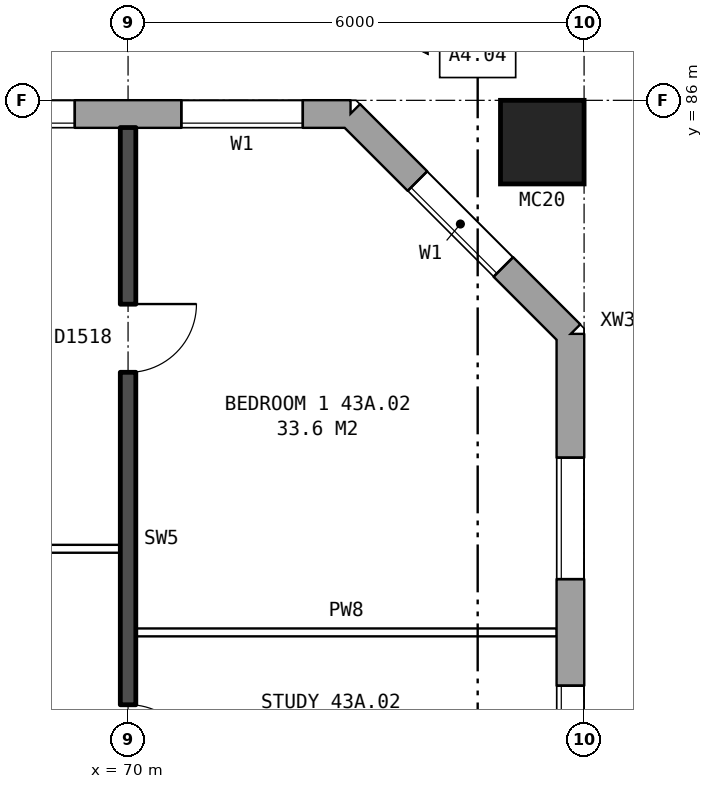
"""IFC4 building model, lengths in metres.
Left out: names, types, materials, properties, quantities, classifications, styles, units other than length and angle.
Written with IfcOpenShell. Run it as: python <this file> out.ifc"""

import sys

from ifc_helpers import new_model, si_unit, direction, frame, frame_2d, origin, origin_2d, place, context, subcontext, project, spatial, rectangle, hollow_rectangle, extrude, element, fill, save


model = new_model("IFC4")
c1 = context("Model", 3, precision=1e-05, world=origin(), true_north=direction((0.0, 1.0)))
c2 = subcontext(c1, "Body", "Model", "MODEL_VIEW")
j1 = project(units=[si_unit("LENGTHUNIT", "METRE"), si_unit("PLANEANGLEUNIT", "RADIAN")], contexts=[c1])
p1 = place(None, origin())
s1 = spatial("IfcSite", under=j1, at=p1, CompositionType="ELEMENT")
p2 = place(p1, origin())
s2 = spatial("IfcBuilding", under=s1, at=p2, CompositionType="ELEMENT")
p3 = place(p2, frame((0.0, 0.0, 154.7)))
s3 = spatial("IfcBuildingStorey", under=s2, at=p3, CompositionType="ELEMENT", Elevation=154.7)
p4 = place(p3, frame((75.45, 85.45, 0.0), z_axis=(0.0, 0.0, 1.0), x_axis=(1.0, 0.0, 0.0)))
e1 = element("IfcColumn", 1, at=p4, inside=s3, PredefinedType="COLUMN", context=c2, shape_type="SweptSolid", body=[
    extrude(hollow_rectangle(XDim=1.1, YDim=1.1, WallThickness=0.06, at=origin_2d()), origin(), (0.0, 0.0, 1.0), 3.1),
])
p5 = place(p3, frame((75.82, 57.075, 0.0), z_axis=(0.0, 0.0, 1.0), x_axis=(0.0, 1.0, 0.0)))
e2 = element("IfcWall", 2, at=p5, inside=s3, PredefinedType="STANDARD", context=c2, shape_type="SweptSolid", body=[
    extrude(rectangle(XDim=25.851, YDim=0.36, at=frame_2d((12.925, 0.0))), origin(), (0.0, 0.0, 1.0), 2.85),
])
p6 = place(p5, frame((1.625, 0.0, 0.8)))
e3 = element("IfcOpeningElement", 3, at=p6, cuts=e2, PredefinedType="OPENING", context=c2, shape_type="SweptSolid", body=[
    extrude(rectangle(XDim=1.6, YDim=1.8, at=frame_2d((0.8, 0.9))), frame((0.0, 0.19, 0.0), z_axis=(0.0, -1.0, 0.0), x_axis=(1.0, 0.0, 0.0)), (0.0, 0.0, 1.0), 0.38),
])
p7 = place(p5, frame((4.625, 0.0, 0.8)))
e4 = element("IfcOpeningElement", 4, at=p7, cuts=e2, PredefinedType="OPENING", context=c2, shape_type="SweptSolid", body=[
    extrude(rectangle(XDim=1.6, YDim=1.8, at=frame_2d((0.8, 0.9))), frame((0.0, 0.19, 0.0), z_axis=(0.0, -1.0, 0.0), x_axis=(1.0, 0.0, 0.0)), (0.0, 0.0, 1.0), 0.38),
])
p8 = place(p5, frame((19.625, 0.0, 0.8)))
e5 = element("IfcOpeningElement", 5, at=p8, cuts=e2, PredefinedType="OPENING", context=c2, shape_type="SweptSolid", body=[
    extrude(rectangle(XDim=1.6, YDim=1.8, at=frame_2d((0.8, 0.9))), frame((0.0, 0.19, 0.0), z_axis=(0.0, -1.0, 0.0), x_axis=(1.0, 0.0, 0.0)), (0.0, 0.0, 1.0), 0.38),
])
p9 = place(p5, frame((22.625, 0.0, 0.8)))
e6 = element("IfcOpeningElement", 6, at=p9, cuts=e2, PredefinedType="OPENING", context=c2, shape_type="SweptSolid", body=[
    extrude(rectangle(XDim=1.6, YDim=1.8, at=frame_2d((0.8, 0.9))), frame((0.0, 0.19, 0.0), z_axis=(0.0, -1.0, 0.0), x_axis=(1.0, 0.0, 0.0)), (0.0, 0.0, 1.0), 0.38),
])
p10 = place(p3, frame((75.82, 82.925, 0.0), z_axis=(0.0, 0.0, 1.0), x_axis=(-0.707106781187, 0.707106781187, 0.0)))
e7 = element("IfcWall", 7, at=p10, inside=s3, PredefinedType="STANDARD", context=c2, shape_type="SweptSolid", body=[
    extrude(rectangle(XDim=4.094, YDim=0.36, at=frame_2d((2.047, 0.0))), origin(), (0.0, 0.0, 1.0), 2.85),
])
p11 = place(p10, frame((1.247, 0.0, 0.8)))
e8 = element("IfcOpeningElement", 8, at=p11, cuts=e7, PredefinedType="OPENING", context=c2, shape_type="SweptSolid", body=[
    extrude(rectangle(XDim=1.6, YDim=1.8, at=frame_2d((0.8, 0.9))), frame((0.0, 0.19, 0.0), z_axis=(0.0, -1.0, 0.0), x_axis=(1.0, 0.0, 0.0)), (0.0, 0.0, 1.0), 0.38),
])
p12 = place(p3, frame((72.925, 85.82, 0.0), z_axis=(0.0, 0.0, 1.0), x_axis=(-1.0, 0.0, 0.0)))
e9 = element("IfcWall", 9, at=p12, inside=s3, PredefinedType="STANDARD", context=c2, shape_type="SweptSolid", body=[
    extrude(rectangle(XDim=41.351, YDim=0.36, at=frame_2d((20.675, 0.0))), origin(), (0.0, 0.0, 1.0), 2.85),
])
p13 = place(p12, frame((0.625, 0.0, 0.8)))
e10 = element("IfcOpeningElement", 10, at=p13, cuts=e9, PredefinedType="OPENING", context=c2, shape_type="SweptSolid", body=[
    extrude(rectangle(XDim=1.6, YDim=1.8, at=frame_2d((0.8, 0.9))), frame((0.0, 0.19, 0.0), z_axis=(0.0, -1.0, 0.0), x_axis=(1.0, 0.0, 0.0)), (0.0, 0.0, 1.0), 0.38),
])
p14 = place(p12, frame((3.625, 0.0, 0.8)))
e11 = element("IfcOpeningElement", 11, at=p14, cuts=e9, PredefinedType="OPENING", context=c2, shape_type="SweptSolid", body=[
    extrude(rectangle(XDim=1.6, YDim=1.8, at=frame_2d((0.8, 0.9))), frame((0.0, 0.19, 0.0), z_axis=(0.0, -1.0, 0.0), x_axis=(1.0, 0.0, 0.0)), (0.0, 0.0, 1.0), 0.38),
])
p15 = place(p12, frame((5.525, 0.0, 1.7)))
e12 = element("IfcOpeningElement", 12, at=p15, cuts=e9, PredefinedType="OPENING", context=c2, shape_type="SweptSolid", body=[
    extrude(rectangle(XDim=1.4, YDim=0.9, at=frame_2d((0.7, 0.45))), frame((0.0, 0.19, 0.0), z_axis=(0.0, -1.0, 0.0), x_axis=(1.0, 0.0, 0.0)), (0.0, 0.0, 1.0), 0.38),
])
p16 = place(p12, frame((9.625, 0.0, 0.8)))
e13 = element("IfcOpeningElement", 13, at=p16, cuts=e9, PredefinedType="OPENING", context=c2, shape_type="SweptSolid", body=[
    extrude(rectangle(XDim=1.6, YDim=1.8, at=frame_2d((0.8, 0.9))), frame((0.0, 0.19, 0.0), z_axis=(0.0, -1.0, 0.0), x_axis=(1.0, 0.0, 0.0)), (0.0, 0.0, 1.0), 0.38),
])
p17 = place(p12, frame((12.625, 0.0, 0.8)))
e14 = element("IfcOpeningElement", 14, at=p17, cuts=e9, PredefinedType="OPENING", context=c2, shape_type="SweptSolid", body=[
    extrude(rectangle(XDim=1.6, YDim=1.8, at=frame_2d((0.8, 0.9))), frame((0.0, 0.19, 0.0), z_axis=(0.0, -1.0, 0.0), x_axis=(1.0, 0.0, 0.0)), (0.0, 0.0, 1.0), 0.38),
])
p18 = place(p12, frame((15.625, 0.0, 0.8)))
e15 = element("IfcOpeningElement", 15, at=p18, cuts=e9, PredefinedType="OPENING", context=c2, shape_type="SweptSolid", body=[
    extrude(rectangle(XDim=1.6, YDim=1.8, at=frame_2d((0.8, 0.9))), frame((0.0, 0.19, 0.0), z_axis=(0.0, -1.0, 0.0), x_axis=(1.0, 0.0, 0.0)), (0.0, 0.0, 1.0), 0.38),
])
p19 = place(p12, frame((18.625, 0.0, 0.8)))
e16 = element("IfcOpeningElement", 16, at=p19, cuts=e9, PredefinedType="OPENING", context=c2, shape_type="SweptSolid", body=[
    extrude(rectangle(XDim=1.6, YDim=1.8, at=frame_2d((0.8, 0.9))), frame((0.0, 0.19, 0.0), z_axis=(0.0, -1.0, 0.0), x_axis=(1.0, 0.0, 0.0)), (0.0, 0.0, 1.0), 0.38),
])
p20 = place(p12, frame((21.625, 0.0, 0.8)))
e17 = element("IfcOpeningElement", 17, at=p20, cuts=e9, PredefinedType="OPENING", context=c2, shape_type="SweptSolid", body=[
    extrude(rectangle(XDim=1.6, YDim=1.8, at=frame_2d((0.8, 0.9))), frame((0.0, 0.19, 0.0), z_axis=(0.0, -1.0, 0.0), x_axis=(1.0, 0.0, 0.0)), (0.0, 0.0, 1.0), 0.38),
])
p21 = place(p12, frame((24.625, 0.0, 0.8)))
e18 = element("IfcOpeningElement", 18, at=p21, cuts=e9, PredefinedType="OPENING", context=c2, shape_type="SweptSolid", body=[
    extrude(rectangle(XDim=1.6, YDim=1.8, at=frame_2d((0.8, 0.9))), frame((0.0, 0.19, 0.0), z_axis=(0.0, -1.0, 0.0), x_axis=(1.0, 0.0, 0.0)), (0.0, 0.0, 1.0), 0.38),
])
p22 = place(p12, frame((27.625, 0.0, 0.8)))
e19 = element("IfcOpeningElement", 19, at=p22, cuts=e9, PredefinedType="OPENING", context=c2, shape_type="SweptSolid", body=[
    extrude(rectangle(XDim=1.6, YDim=1.8, at=frame_2d((0.8, 0.9))), frame((0.0, 0.19, 0.0), z_axis=(0.0, -1.0, 0.0), x_axis=(1.0, 0.0, 0.0)), (0.0, 0.0, 1.0), 0.38),
])
p23 = place(p12, frame((30.625, 0.0, 0.8)))
e20 = element("IfcOpeningElement", 20, at=p23, cuts=e9, PredefinedType="OPENING", context=c2, shape_type="SweptSolid", body=[
    extrude(rectangle(XDim=1.6, YDim=1.8, at=frame_2d((0.8, 0.9))), frame((0.0, 0.19, 0.0), z_axis=(0.0, -1.0, 0.0), x_axis=(1.0, 0.0, 0.0)), (0.0, 0.0, 1.0), 0.38),
])
p24 = place(p12, frame((34.425, 0.0, 1.7)))
e21 = element("IfcOpeningElement", 21, at=p24, cuts=e9, PredefinedType="OPENING", context=c2, shape_type="SweptSolid", body=[
    extrude(rectangle(XDim=0.6, YDim=0.9, at=frame_2d((0.3, 0.45))), frame((0.0, 0.19, 0.0), z_axis=(0.0, -1.0, 0.0), x_axis=(1.0, 0.0, 0.0)), (0.0, 0.0, 1.0), 0.38),
])
p25 = place(p12, frame((36.625, 0.0, 0.8)))
e22 = element("IfcOpeningElement", 22, at=p25, cuts=e9, PredefinedType="OPENING", context=c2, shape_type="SweptSolid", body=[
    extrude(rectangle(XDim=1.6, YDim=1.8, at=frame_2d((0.8, 0.9))), frame((0.0, 0.19, 0.0), z_axis=(0.0, -1.0, 0.0), x_axis=(1.0, 0.0, 0.0)), (0.0, 0.0, 1.0), 0.38),
])
p26 = place(p12, frame((35.325, 0.0, 1.0)))
e23 = element("IfcOpeningElement", 23, at=p26, cuts=e9, PredefinedType="OPENING", context=c2, shape_type="SweptSolid", body=[
    extrude(rectangle(XDim=1.0, YDim=1.5, at=frame_2d((0.5, 0.75))), frame((0.0, 0.19, 0.0), z_axis=(0.0, -1.0, 0.0), x_axis=(1.0, 0.0, 0.0)), (0.0, 0.0, 1.0), 0.38),
])
p27 = place(p3, frame((70.1, 79.0, 0.0), z_axis=(0.0, 0.0, 1.0), x_axis=(1.0, 0.0, 0.0)))
e24 = element("IfcWall", 24, at=p27, inside=s3, PredefinedType="PARTITIONING", context=c2, shape_type="SweptSolid", body=[
    extrude(rectangle(XDim=5.54, YDim=0.1, at=frame_2d((2.77, 0.0))), origin(), (0.0, 0.0, 1.0), 2.85),
])
p28 = place(p3, frame((64.1, 80.1, 0.0), z_axis=(0.0, 0.0, 1.0), x_axis=(1.0, 0.0, 0.0)))
e25 = element("IfcWall", 25, at=p28, inside=s3, PredefinedType="PARTITIONING", context=c2, shape_type="SweptSolid", body=[
    extrude(rectangle(XDim=5.8, YDim=0.1, at=frame_2d((2.9, 0.0))), origin(), (0.0, 0.0, 1.0), 2.85),
])
p29 = place(p28, frame((3.6, 0.0, 0.0)))
e26 = element("IfcOpeningElement", 26, at=p29, cuts=e25, PredefinedType="OPENING", context=c2, shape_type="SweptSolid", body=[
    extrude(rectangle(XDim=0.9, YDim=2.1, at=frame_2d((0.45, 1.05))), frame((0.0, 0.06, 0.0), z_axis=(0.0, -1.0, 0.0), x_axis=(1.0, 0.0, 0.0)), (0.0, 0.0, 1.0), 0.12),
])
p30 = place(p28, frame((0.7, 0.0, 0.0)))
e27 = element("IfcOpeningElement", 27, at=p30, cuts=e25, PredefinedType="OPENING", context=c2, shape_type="SweptSolid", body=[
    extrude(rectangle(XDim=0.9, YDim=2.1, at=frame_2d((0.45, 1.05))), frame((0.0, 0.06, 0.0), z_axis=(0.0, -1.0, 0.0), x_axis=(1.0, 0.0, 0.0)), (0.0, 0.0, 1.0), 0.12),
])
p31 = place(p3, frame((70.0, 76.2, 0.0), z_axis=(0.0, 0.0, 1.0), x_axis=(0.0, 1.0, 0.0)))
e28 = element("IfcWall", 28, at=p31, inside=s3, PredefinedType="SOLIDWALL", context=c2, shape_type="SweptSolid", body=[
    extrude(rectangle(XDim=9.44, YDim=0.2, at=frame_2d((4.72, 0.0))), origin(), (0.0, 0.0, 1.0), 2.85),
])
p32 = place(p31, frame((6.22, 0.0, 0.0)))
e29 = element("IfcOpeningElement", 29, at=p32, cuts=e28, PredefinedType="OPENING", context=c2, shape_type="SweptSolid", body=[
    extrude(rectangle(XDim=0.9, YDim=2.1, at=frame_2d((0.45, 1.05))), frame((0.0, 0.11, 0.0), z_axis=(0.0, -1.0, 0.0), x_axis=(1.0, 0.0, 0.0)), (0.0, 0.0, 1.0), 0.22),
])
p33 = place(p31, frame((0.95, 0.0, 0.0)))
e30 = element("IfcOpeningElement", 30, at=p33, cuts=e28, PredefinedType="OPENING", context=c2, shape_type="SweptSolid", body=[
    extrude(rectangle(XDim=0.9, YDim=2.1, at=frame_2d((0.45, 1.05))), frame((0.0, 0.11, 0.0), z_axis=(0.0, -1.0, 0.0), x_axis=(1.0, 0.0, 0.0)), (0.0, 0.0, 1.0), 0.22),
])
p34 = place(p8, origin())
e31 = element("IfcWindow", 31, at=p34, inside=s3, PartitioningType="SINGLE_PANEL", PredefinedType="WINDOW", context=c2, shape_type="SweptSolid", body=[
    extrude(rectangle(XDim=1.6, YDim=1.8, at=frame_2d((0.8, 0.9))), frame((0.0, 0.15, 0.0), z_axis=(0.0, -1.0, 0.0), x_axis=(1.0, 0.0, 0.0)), (0.0, 0.0, 1.0), 0.06),
])
fill(e5, e31)
p35 = place(p9, origin())
e32 = element("IfcWindow", 32, at=p35, inside=s3, PartitioningType="SINGLE_PANEL", PredefinedType="WINDOW", context=c2, shape_type="SweptSolid", body=[
    extrude(rectangle(XDim=1.6, YDim=1.8, at=frame_2d((0.8, 0.9))), frame((0.0, 0.15, 0.0), z_axis=(0.0, -1.0, 0.0), x_axis=(1.0, 0.0, 0.0)), (0.0, 0.0, 1.0), 0.06),
])
fill(e6, e32)
p36 = place(p11, origin())
e33 = element("IfcWindow", 33, at=p36, inside=s3, PartitioningType="SINGLE_PANEL", PredefinedType="WINDOW", context=c2, shape_type="SweptSolid", body=[
    extrude(rectangle(XDim=1.6, YDim=1.8, at=frame_2d((0.8, 0.9))), frame((0.0, 0.15, 0.0), z_axis=(0.0, -1.0, 0.0), x_axis=(1.0, 0.0, 0.0)), (0.0, 0.0, 1.0), 0.06),
])
fill(e8, e33)
p37 = place(p13, origin())
e34 = element("IfcWindow", 34, at=p37, inside=s3, PartitioningType="SINGLE_PANEL", PredefinedType="WINDOW", context=c2, shape_type="SweptSolid", body=[
    extrude(rectangle(XDim=1.6, YDim=1.8, at=frame_2d((0.8, 0.9))), frame((0.0, 0.15, 0.0), z_axis=(0.0, -1.0, 0.0), x_axis=(1.0, 0.0, 0.0)), (0.0, 0.0, 1.0), 0.06),
])
fill(e10, e34)
p38 = place(p14, origin())
e35 = element("IfcWindow", 35, at=p38, inside=s3, PartitioningType="SINGLE_PANEL", PredefinedType="WINDOW", context=c2, shape_type="SweptSolid", body=[
    extrude(rectangle(XDim=1.6, YDim=1.8, at=frame_2d((0.8, 0.9))), frame((0.0, 0.15, 0.0), z_axis=(0.0, -1.0, 0.0), x_axis=(1.0, 0.0, 0.0)), (0.0, 0.0, 1.0), 0.06),
])
fill(e11, e35)
p39 = place(p32, frame((0.9, 0.0, 0.0), z_axis=(0.0, 0.0, 1.0), x_axis=(-1.0, 0.0, 0.0)))
e36 = element("IfcDoor", 36, at=p39, inside=s3, OperationType="SINGLE_SWING_LEFT", PredefinedType="DOOR", context=c2, shape_type="SweptSolid", body=[
    extrude(rectangle(XDim=0.9, YDim=2.1, at=frame_2d((0.45, 1.05))), frame((0.0, 0.025, 0.0), z_axis=(0.0, -1.0, 0.0), x_axis=(1.0, 0.0, 0.0)), (0.0, 0.0, 1.0), 0.05),
])
fill(e29, e36)
p40 = place(p33, frame((0.9, 0.0, 0.0), z_axis=(0.0, 0.0, 1.0), x_axis=(-1.0, 0.0, 0.0)))
e37 = element("IfcDoor", 37, at=p40, inside=s3, OperationType="SINGLE_SWING_RIGHT", PredefinedType="DOOR", context=c2, shape_type="SweptSolid", body=[
    extrude(rectangle(XDim=0.9, YDim=2.1, at=frame_2d((0.45, 1.05))), frame((0.0, 0.025, 0.0), z_axis=(0.0, -1.0, 0.0), x_axis=(1.0, 0.0, 0.0)), (0.0, 0.0, 1.0), 0.05),
])
fill(e30, e37)
save(model, sys.argv[1])
